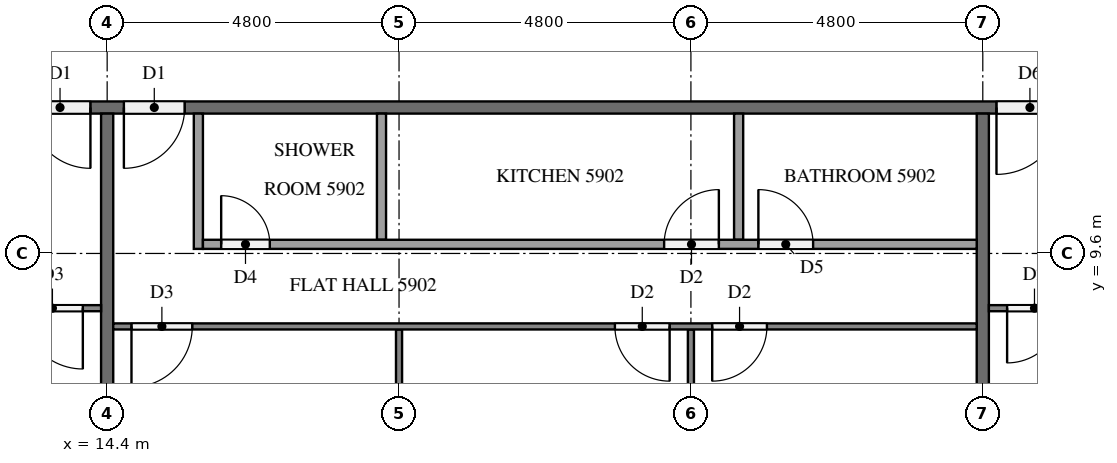
"""IFC4 building model, lengths in metres.
Left out: names, types, materials, properties, quantities, classifications, styles, units other than length and angle.
Written with IfcOpenShell. Run it as: python <this file> out.ifc"""

import sys

from ifc_helpers import new_model, si_unit, direction, frame, frame_2d, origin, place, context, subcontext, project, spatial, rectangle, extrude, element, fill, save


model = new_model("IFC4")
c1 = context("Model", 3, precision=1e-05, world=origin(), true_north=direction((0.0, 1.0)))
c2 = subcontext(c1, "Body", "Model", "MODEL_VIEW")
j1 = project(units=[si_unit("LENGTHUNIT", "METRE"), si_unit("PLANEANGLEUNIT", "RADIAN")], contexts=[c1])
p1 = place(None, origin())
s1 = spatial("IfcSite", under=j1, at=p1, CompositionType="ELEMENT")
p2 = place(p1, origin())
s2 = spatial("IfcBuilding", under=s1, at=p2, CompositionType="ELEMENT")
p3 = place(p2, frame((0.0, 0.0, 226.3)))
s3 = spatial("IfcBuildingStorey", under=s2, at=p3, CompositionType="ELEMENT", Elevation=226.3)
p4 = place(p3, frame((50.5, 12.0, 0.0), z_axis=(0.0, 0.0, 1.0), x_axis=(-1.0, 0.0, 0.0)))
e1 = element("IfcWall", 1, at=p4, inside=s3, PredefinedType="PARTITIONING", context=c2, shape_type="SweptSolid", body=[
    extrude(rectangle(XDim=38.6, YDim=0.2, at=frame_2d((19.3, 0.0))), origin(), (0.0, 0.0, 1.0), 3.2),
])
p5 = place(p4, frame((36.375, 0.0, 0.0)))
e2 = element("IfcOpeningElement", 2, at=p5, cuts=e1, PredefinedType="OPENING", context=c2, shape_type="SweptSolid", body=[
    extrude(rectangle(XDim=1.0, YDim=2.1, at=frame_2d((0.5, 1.05))), frame((0.0, 0.11, 0.0), z_axis=(0.0, -1.0, 0.0), x_axis=(1.0, 0.0, 0.0)), (0.0, 0.0, 1.0), 0.22),
])
p6 = place(p4, frame((34.825, 0.0, 0.0)))
e3 = element("IfcOpeningElement", 3, at=p6, cuts=e1, PredefinedType="OPENING", context=c2, shape_type="SweptSolid", body=[
    extrude(rectangle(XDim=1.0, YDim=2.1, at=frame_2d((0.5, 1.05))), frame((0.0, 0.11, 0.0), z_axis=(0.0, -1.0, 0.0), x_axis=(1.0, 0.0, 0.0)), (0.0, 0.0, 1.0), 0.22),
])
p7 = place(p4, frame((20.375, 0.0, 0.0)))
e4 = element("IfcOpeningElement", 4, at=p7, cuts=e1, PredefinedType="OPENING", context=c2, shape_type="SweptSolid", body=[
    extrude(rectangle(XDim=1.1, YDim=2.1, at=frame_2d((0.55, 1.05))), frame((0.0, 0.11, 0.0), z_axis=(0.0, -1.0, 0.0), x_axis=(1.0, 0.0, 0.0)), (0.0, 0.0, 1.0), 0.22),
])
p8 = place(p4, frame((1.225, 0.0, 0.0)))
e5 = element("IfcOpeningElement", 5, at=p8, cuts=e1, PredefinedType="OPENING", context=c2, shape_type="SweptSolid", body=[
    extrude(rectangle(XDim=1.0, YDim=2.1, at=frame_2d((0.5, 1.05))), frame((0.0, 0.11, 0.0), z_axis=(0.0, -1.0, 0.0), x_axis=(1.0, 0.0, 0.0)), (0.0, 0.0, 1.0), 0.22),
])
p9 = place(p3, frame((14.4, 11.9, 0.0), z_axis=(0.0, 0.0, 1.0), x_axis=(0.0, -1.0, 0.0)))
e6 = element("IfcWall", 6, at=p9, inside=s3, PredefinedType="PARTITIONING", context=c2, shape_type="SweptSolid", body=[
    extrude(rectangle(XDim=7.0, YDim=0.2, at=frame_2d((3.5, 0.0))), origin(), (0.0, 0.0, 1.0), 3.2),
])
p10 = place(p3, frame((28.8, 11.9, 0.0), z_axis=(0.0, 0.0, 1.0), x_axis=(0.0, -1.0, 0.0)))
e7 = element("IfcWall", 7, at=p10, inside=s3, PredefinedType="PARTITIONING", context=c2, shape_type="SweptSolid", body=[
    extrude(rectangle(XDim=6.775, YDim=0.2, at=frame_2d((3.387, 0.0))), origin(), (0.0, 0.0, 1.0), 3.2),
])
p11 = place(p3, frame((14.3, 8.7, 0.0), z_axis=(0.0, 0.0, 1.0), x_axis=(-1.0, 0.0, 0.0)))
e8 = element("IfcWall", 8, at=p11, inside=s3, PredefinedType="PARTITIONING", context=c2, shape_type="SweptSolid", body=[
    extrude(rectangle(XDim=9.159, YDim=0.1, at=frame_2d((4.58, 0.0))), origin(), (0.0, 0.0, 1.0), 3.2),
])
p12 = place(p11, frame((0.3, 0.0, 0.0)))
e9 = element("IfcOpeningElement", 9, at=p12, cuts=e8, PredefinedType="OPENING", context=c2, shape_type="SweptSolid", body=[
    extrude(rectangle(XDim=1.0, YDim=2.1, at=frame_2d((0.5, 1.05))), frame((0.0, 0.06, 0.0), z_axis=(0.0, -1.0, 0.0), x_axis=(1.0, 0.0, 0.0)), (0.0, 0.0, 1.0), 0.12),
])
p13 = place(p11, frame((7.959, 0.0, 0.0)))
e10 = element("IfcOpeningElement", 10, at=p13, cuts=e8, PredefinedType="OPENING", context=c2, shape_type="SweptSolid", body=[
    extrude(rectangle(XDim=0.9, YDim=2.1, at=frame_2d((0.45, 1.05))), frame((0.0, 0.06, 0.0), z_axis=(0.0, -1.0, 0.0), x_axis=(1.0, 0.0, 0.0)), (0.0, 0.0, 1.0), 0.12),
])
p14 = place(p3, frame((19.2, 8.35, 0.0), z_axis=(0.0, 0.0, 1.0), x_axis=(0.0, -1.0, 0.0)))
e11 = element("IfcWall", 11, at=p14, inside=s3, PredefinedType="PARTITIONING", context=c2, shape_type="SweptSolid", body=[
    extrude(rectangle(XDim=3.225, YDim=0.1, at=frame_2d((1.613, 0.0))), origin(), (0.0, 0.0, 1.0), 3.2),
])
p15 = place(p3, frame((24.0, 8.35, 0.0), z_axis=(0.0, 0.0, 1.0), x_axis=(0.0, -1.0, 0.0)))
e12 = element("IfcWall", 12, at=p15, inside=s3, PredefinedType="PARTITIONING", context=c2, shape_type="SweptSolid", body=[
    extrude(rectangle(XDim=3.45, YDim=0.1, at=frame_2d((1.725, 0.0))), origin(), (0.0, 0.0, 1.0), 3.2),
])
p16 = place(p3, frame((28.7, 8.4, 0.0), z_axis=(0.0, 0.0, 1.0), x_axis=(-1.0, 0.0, 0.0)))
e13 = element("IfcWall", 13, at=p16, inside=s3, PredefinedType="PARTITIONING", context=c2, shape_type="SweptSolid", body=[
    extrude(rectangle(XDim=14.2, YDim=0.1, at=frame_2d((7.1, 0.0))), origin(), (0.0, 0.0, 1.0), 3.2),
])
p17 = place(p16, frame((12.9, 0.0, 0.0)))
e14 = element("IfcOpeningElement", 14, at=p17, cuts=e13, PredefinedType="OPENING", context=c2, shape_type="SweptSolid", body=[
    extrude(rectangle(XDim=1.0, YDim=2.1, at=frame_2d((0.5, 1.05))), frame((0.0, 0.06, 0.0), z_axis=(0.0, -1.0, 0.0), x_axis=(1.0, 0.0, 0.0)), (0.0, 0.0, 1.0), 0.12),
])
p18 = place(p16, frame((5.05, 0.0, 0.0)))
e15 = element("IfcOpeningElement", 15, at=p18, cuts=e13, PredefinedType="OPENING", context=c2, shape_type="SweptSolid", body=[
    extrude(rectangle(XDim=0.9, YDim=2.1, at=frame_2d((0.45, 1.05))), frame((0.0, 0.06, 0.0), z_axis=(0.0, -1.0, 0.0), x_axis=(1.0, 0.0, 0.0)), (0.0, 0.0, 1.0), 0.12),
])
p19 = place(p16, frame((3.45, 0.0, 0.0)))
e16 = element("IfcOpeningElement", 16, at=p19, cuts=e13, PredefinedType="OPENING", context=c2, shape_type="SweptSolid", body=[
    extrude(rectangle(XDim=0.9, YDim=2.1, at=frame_2d((0.45, 1.05))), frame((0.0, 0.06, 0.0), z_axis=(0.0, -1.0, 0.0), x_axis=(1.0, 0.0, 0.0)), (0.0, 0.0, 1.0), 0.12),
])
for number, where, z_axis, x_axis in (
    (17, (18.912, 11.9, 0.0), (0.0, 0.0, 1.0), (0.0, -1.0, 0.0)),
    (18, (24.785, 11.9, 0.0), (0.0, 0.0, 1.0), (0.0, -1.0, 0.0)),
):
    element("IfcWall", number, at=place(p3, frame(where, z_axis=z_axis, x_axis=x_axis)), inside=s3, PredefinedType="PARTITIONING", context=c2, shape_type="SweptSolid", body=[
        extrude(rectangle(XDim=2.075, YDim=0.15, at=frame_2d((1.038, 0.0))), origin(), (0.0, 0.0, 1.0), 3.2),
    ])
p20 = place(p3, frame((15.9, 11.9, 0.0), z_axis=(0.0, 0.0, 1.0), x_axis=(0.0, -1.0, 0.0)))
e19 = element("IfcWall", 19, at=p20, inside=s3, PredefinedType="PARTITIONING", context=c2, shape_type="SweptSolid", body=[
    extrude(rectangle(XDim=2.225, YDim=0.15, at=frame_2d((1.112, 0.0))), origin(), (0.0, 0.0, 1.0), 3.2),
])
p21 = place(p3, frame((15.975, 9.75, 0.0), z_axis=(0.0, 0.0, 1.0), x_axis=(1.0, 0.0, 0.0)))
e20 = element("IfcWall", 20, at=p21, inside=s3, PredefinedType="PARTITIONING", context=c2, shape_type="SweptSolid", body=[
    extrude(rectangle(XDim=12.725, YDim=0.15, at=frame_2d((6.362, 0.0))), origin(), (0.0, 0.0, 1.0), 3.2),
])
p22 = place(p21, frame((0.3, 0.0, 0.0)))
e21 = element("IfcOpeningElement", 21, at=p22, cuts=e20, PredefinedType="OPENING", context=c2, shape_type="SweptSolid", body=[
    extrude(rectangle(XDim=0.8, YDim=2.1, at=frame_2d((0.4, 1.05))), frame((0.0, 0.085, 0.0), z_axis=(0.0, -1.0, 0.0), x_axis=(1.0, 0.0, 0.0)), (0.0, 0.0, 1.0), 0.17),
])
p23 = place(p21, frame((7.585, 0.0, 0.0)))
e22 = element("IfcOpeningElement", 22, at=p23, cuts=e20, PredefinedType="OPENING", context=c2, shape_type="SweptSolid", body=[
    extrude(rectangle(XDim=0.9, YDim=2.1, at=frame_2d((0.45, 1.05))), frame((0.0, 0.085, 0.0), z_axis=(0.0, -1.0, 0.0), x_axis=(1.0, 0.0, 0.0)), (0.0, 0.0, 1.0), 0.17),
])
p24 = place(p21, frame((9.135, 0.0, 0.0)))
e23 = element("IfcOpeningElement", 23, at=p24, cuts=e20, PredefinedType="OPENING", context=c2, shape_type="SweptSolid", body=[
    extrude(rectangle(XDim=0.9, YDim=2.1, at=frame_2d((0.45, 1.05))), frame((0.0, 0.085, 0.0), z_axis=(0.0, -1.0, 0.0), x_axis=(1.0, 0.0, 0.0)), (0.0, 0.0, 1.0), 0.17),
])
p25 = place(p3, frame((47.9, 8.7, 0.0), z_axis=(0.0, 0.0, 1.0), x_axis=(-1.0, 0.0, 0.0)))
e24 = element("IfcWall", 24, at=p25, inside=s3, PredefinedType="PARTITIONING", context=c2, shape_type="SweptSolid", body=[
    extrude(rectangle(XDim=19.0, YDim=0.1, at=frame_2d((9.5, 0.0))), origin(), (0.0, 0.0, 1.0), 3.2),
])
p26 = place(p25, frame((17.8, 0.0, 0.0)))
e25 = element("IfcOpeningElement", 25, at=p26, cuts=e24, PredefinedType="OPENING", context=c2, shape_type="SweptSolid", body=[
    extrude(rectangle(XDim=0.9, YDim=2.1, at=frame_2d((0.45, 1.05))), frame((0.0, 0.06, 0.0), z_axis=(0.0, -1.0, 0.0), x_axis=(1.0, 0.0, 0.0)), (0.0, 0.0, 1.0), 0.12),
])
p27 = place(p25, frame((9.85, 0.0, 0.0)))
e26 = element("IfcOpeningElement", 26, at=p27, cuts=e24, PredefinedType="OPENING", context=c2, shape_type="SweptSolid", body=[
    extrude(rectangle(XDim=0.9, YDim=2.1, at=frame_2d((0.45, 1.05))), frame((0.0, 0.06, 0.0), z_axis=(0.0, -1.0, 0.0), x_axis=(1.0, 0.0, 0.0)), (0.0, 0.0, 1.0), 0.12),
])
p28 = place(p25, frame((8.25, 0.0, 0.0)))
e27 = element("IfcOpeningElement", 27, at=p28, cuts=e24, PredefinedType="OPENING", context=c2, shape_type="SweptSolid", body=[
    extrude(rectangle(XDim=0.9, YDim=2.1, at=frame_2d((0.45, 1.05))), frame((0.0, 0.06, 0.0), z_axis=(0.0, -1.0, 0.0), x_axis=(1.0, 0.0, 0.0)), (0.0, 0.0, 1.0), 0.12),
])
p29 = place(p25, frame((0.3, 0.0, 0.0)))
e28 = element("IfcOpeningElement", 28, at=p29, cuts=e24, PredefinedType="OPENING", context=c2, shape_type="SweptSolid", body=[
    extrude(rectangle(XDim=1.0, YDim=2.1, at=frame_2d((0.5, 1.05))), frame((0.0, 0.06, 0.0), z_axis=(0.0, -1.0, 0.0), x_axis=(1.0, 0.0, 0.0)), (0.0, 0.0, 1.0), 0.12),
])
p30 = place(p5, origin())
e29 = element("IfcDoor", 29, at=p30, inside=s3, OperationType="SINGLE_SWING_LEFT", PredefinedType="DOOR", context=c2, shape_type="SweptSolid", body=[
    extrude(rectangle(XDim=1.0, YDim=2.1, at=frame_2d((0.5, 1.05))), frame((0.0, 0.025, 0.0), z_axis=(0.0, -1.0, 0.0), x_axis=(1.0, 0.0, 0.0)), (0.0, 0.0, 1.0), 0.05),
])
fill(e2, e29)
p31 = place(p6, origin())
e30 = element("IfcDoor", 30, at=p31, inside=s3, OperationType="SINGLE_SWING_RIGHT", PredefinedType="DOOR", context=c2, shape_type="SweptSolid", body=[
    extrude(rectangle(XDim=1.0, YDim=2.1, at=frame_2d((0.5, 1.05))), frame((0.0, 0.025, 0.0), z_axis=(0.0, -1.0, 0.0), x_axis=(1.0, 0.0, 0.0)), (0.0, 0.0, 1.0), 0.05),
])
fill(e3, e30)
p32 = place(p7, origin())
e31 = element("IfcDoor", 31, at=p32, inside=s3, OperationType="SINGLE_SWING_RIGHT", PredefinedType="DOOR", context=c2, shape_type="SweptSolid", body=[
    extrude(rectangle(XDim=1.1, YDim=2.1, at=frame_2d((0.55, 1.05))), frame((0.0, 0.025, 0.0), z_axis=(0.0, -1.0, 0.0), x_axis=(1.0, 0.0, 0.0)), (0.0, 0.0, 1.0), 0.05),
])
fill(e4, e31)
p33 = place(p12, origin())
e32 = element("IfcDoor", 32, at=p33, inside=s3, OperationType="SINGLE_SWING_LEFT", PredefinedType="DOOR", context=c2, shape_type="SweptSolid", body=[
    extrude(rectangle(XDim=1.0, YDim=2.1, at=frame_2d((0.5, 1.05))), frame((0.0, 0.025, 0.0), z_axis=(0.0, -1.0, 0.0), x_axis=(1.0, 0.0, 0.0)), (0.0, 0.0, 1.0), 0.05),
])
fill(e9, e32)
p34 = place(p17, origin())
e33 = element("IfcDoor", 33, at=p34, inside=s3, OperationType="SINGLE_SWING_RIGHT", PredefinedType="DOOR", context=c2, shape_type="SweptSolid", body=[
    extrude(rectangle(XDim=1.0, YDim=2.1, at=frame_2d((0.5, 1.05))), frame((0.0, 0.025, 0.0), z_axis=(0.0, -1.0, 0.0), x_axis=(1.0, 0.0, 0.0)), (0.0, 0.0, 1.0), 0.05),
])
fill(e14, e33)
p35 = place(p18, origin())
e34 = element("IfcDoor", 34, at=p35, inside=s3, OperationType="SINGLE_SWING_LEFT", PredefinedType="DOOR", context=c2, shape_type="SweptSolid", body=[
    extrude(rectangle(XDim=0.9, YDim=2.1, at=frame_2d((0.45, 1.05))), frame((0.0, 0.025, 0.0), z_axis=(0.0, -1.0, 0.0), x_axis=(1.0, 0.0, 0.0)), (0.0, 0.0, 1.0), 0.05),
])
fill(e15, e34)
p36 = place(p19, origin())
e35 = element("IfcDoor", 35, at=p36, inside=s3, OperationType="SINGLE_SWING_RIGHT", PredefinedType="DOOR", context=c2, shape_type="SweptSolid", body=[
    extrude(rectangle(XDim=0.9, YDim=2.1, at=frame_2d((0.45, 1.05))), frame((0.0, 0.025, 0.0), z_axis=(0.0, -1.0, 0.0), x_axis=(1.0, 0.0, 0.0)), (0.0, 0.0, 1.0), 0.05),
])
fill(e16, e35)
p37 = place(p22, origin())
e36 = element("IfcDoor", 36, at=p37, inside=s3, OperationType="SINGLE_SWING_LEFT", PredefinedType="DOOR", context=c2, shape_type="SweptSolid", body=[
    extrude(rectangle(XDim=0.8, YDim=2.1, at=frame_2d((0.4, 1.05))), frame((0.0, 0.025, 0.0), z_axis=(0.0, -1.0, 0.0), x_axis=(1.0, 0.0, 0.0)), (0.0, 0.0, 1.0), 0.05),
])
fill(e21, e36)
p38 = place(p23, origin())
e37 = element("IfcDoor", 37, at=p38, inside=s3, OperationType="SINGLE_SWING_RIGHT", PredefinedType="DOOR", context=c2, shape_type="SweptSolid", body=[
    extrude(rectangle(XDim=0.9, YDim=2.1, at=frame_2d((0.45, 1.05))), frame((0.0, 0.025, 0.0), z_axis=(0.0, -1.0, 0.0), x_axis=(1.0, 0.0, 0.0)), (0.0, 0.0, 1.0), 0.05),
])
fill(e22, e37)
p39 = place(p24, origin())
e38 = element("IfcDoor", 38, at=p39, inside=s3, OperationType="SINGLE_SWING_LEFT", PredefinedType="DOOR", context=c2, shape_type="SweptSolid", body=[
    extrude(rectangle(XDim=0.9, YDim=2.1, at=frame_2d((0.45, 1.05))), frame((0.0, 0.025, 0.0), z_axis=(0.0, -1.0, 0.0), x_axis=(1.0, 0.0, 0.0)), (0.0, 0.0, 1.0), 0.05),
])
fill(e23, e38)
p40 = place(p26, origin())
e39 = element("IfcDoor", 39, at=p40, inside=s3, OperationType="SINGLE_SWING_RIGHT", PredefinedType="DOOR", context=c2, shape_type="SweptSolid", body=[
    extrude(rectangle(XDim=0.9, YDim=2.1, at=frame_2d((0.45, 1.05))), frame((0.0, 0.025, 0.0), z_axis=(0.0, -1.0, 0.0), x_axis=(1.0, 0.0, 0.0)), (0.0, 0.0, 1.0), 0.05),
])
fill(e25, e39)
save(model, sys.argv[1])
